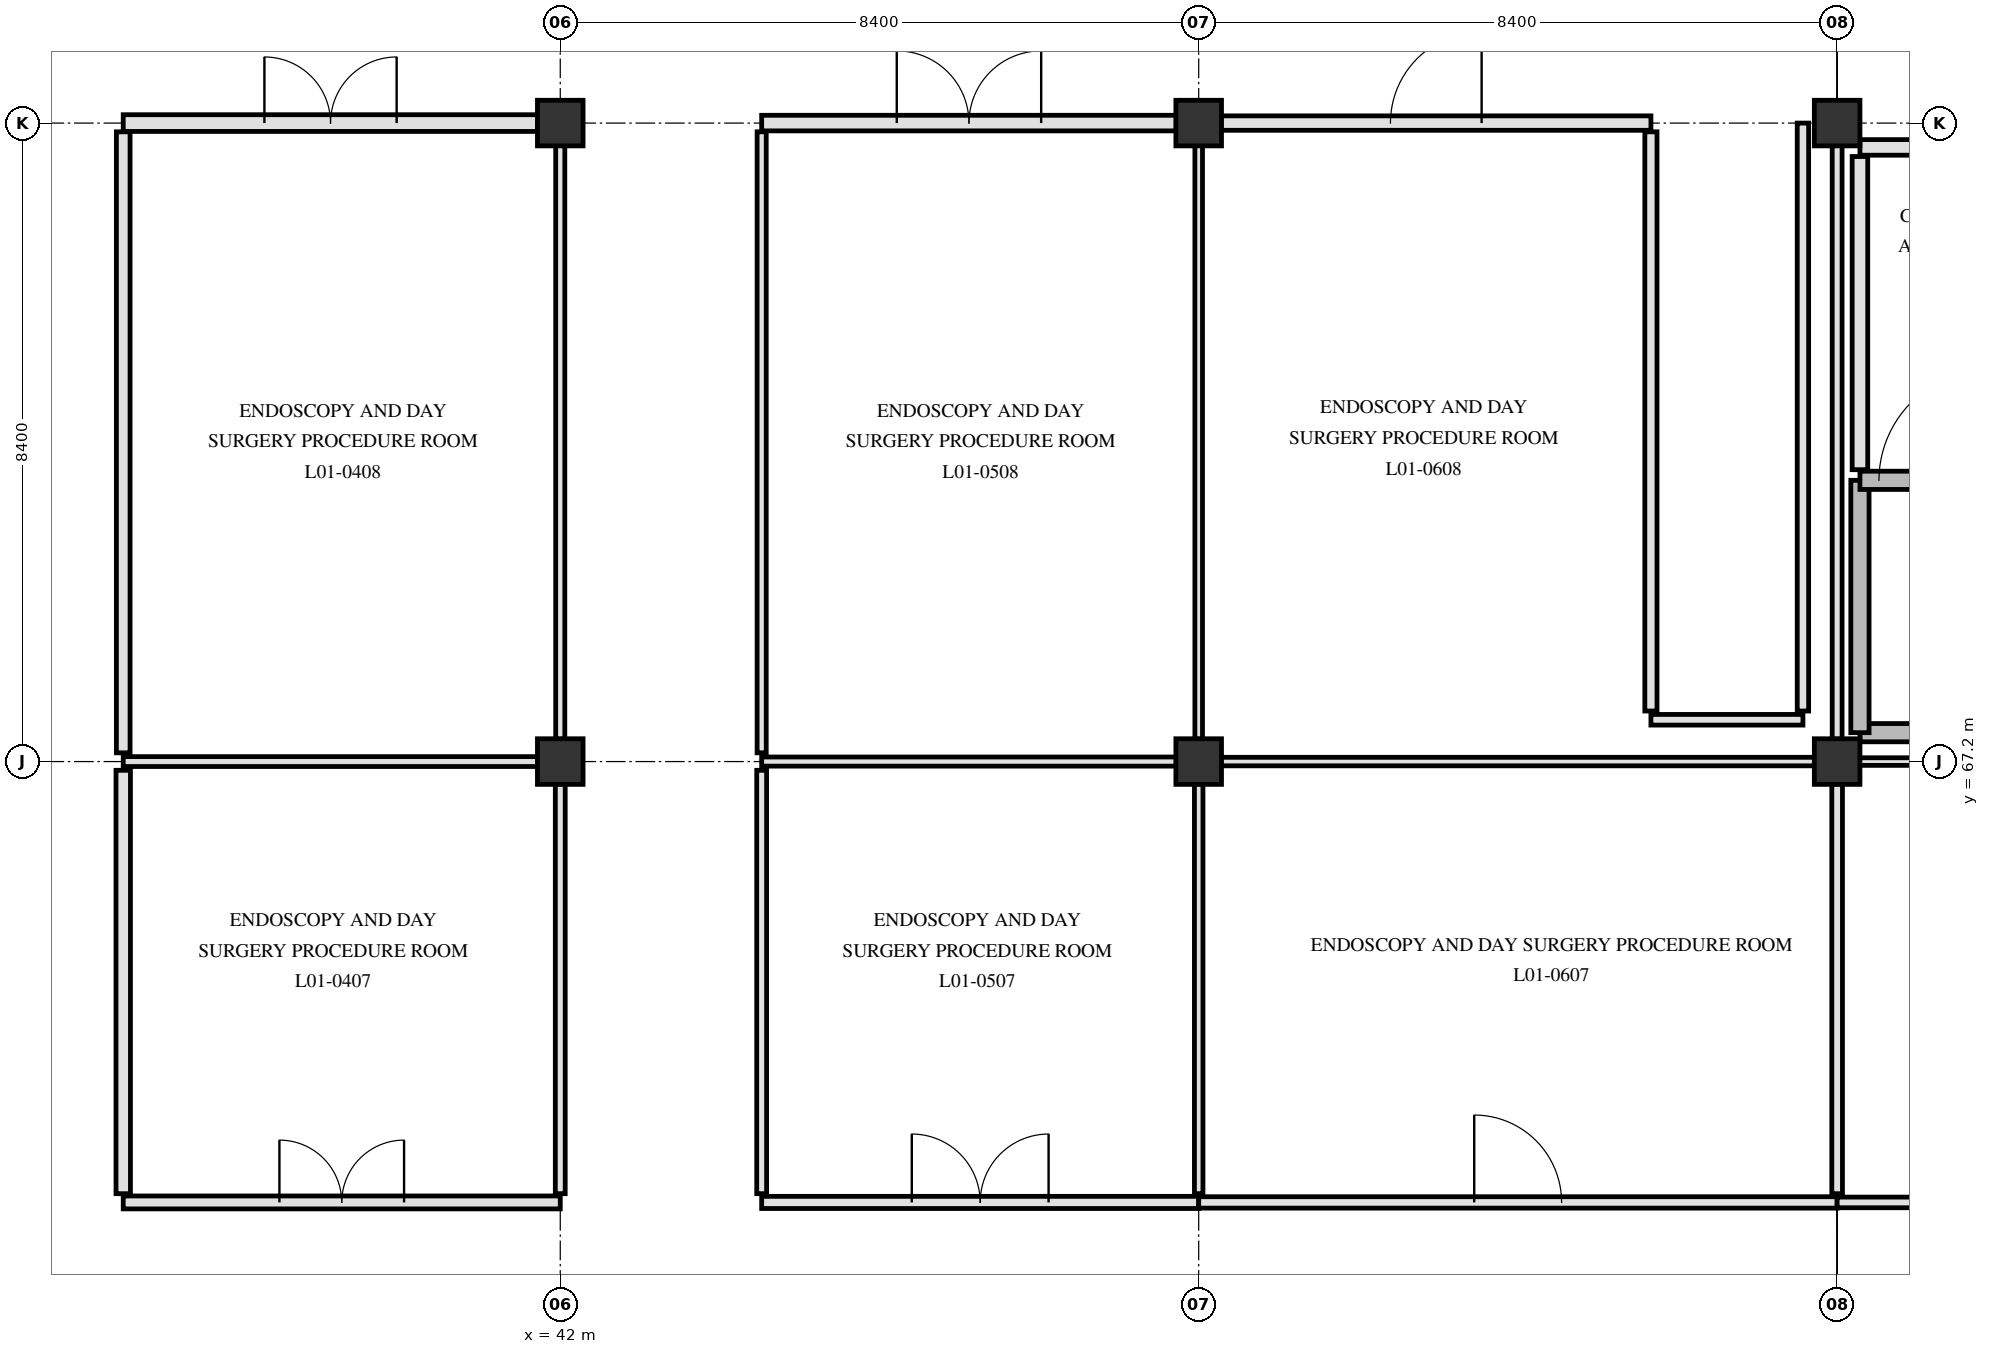
"""IFC4 building model, lengths in metres.
Left out: names, types, materials, properties, quantities, classifications, styles, units other than length and angle.
Written with IfcOpenShell. Run it as: python <this file> out.ifc"""

import sys

from ifc_helpers import new_model, si_unit, direction, frame, frame_2d, origin, origin_2d, place, context, subcontext, project, spatial, rectangle, extrude, element, fill, save


model = new_model("IFC4")
c1 = context("Model", 3, precision=1e-05, world=origin(), true_north=direction((0.0, 1.0)))
c2 = subcontext(c1, "Body", "Model", "MODEL_VIEW")
j1 = project(units=[si_unit("LENGTHUNIT", "METRE"), si_unit("PLANEANGLEUNIT", "RADIAN")], contexts=[c1])
p1 = place(None, origin())
s1 = spatial("IfcSite", under=j1, at=p1, CompositionType="ELEMENT")
p2 = place(p1, origin())
s2 = spatial("IfcBuilding", under=s1, at=p2, CompositionType="ELEMENT")
p3 = place(p2, frame((0.0, 0.0, 4.8)))
s3 = spatial("IfcBuildingStorey", under=s2, at=p3, CompositionType="ELEMENT", Elevation=4.8)
for number, where, z_axis, x_axis in (
    (1, (42.0, 67.2, 0.0), (0.0, 0.0, 1.0), (1.0, 0.0, 0.0)),
    (2, (42.0, 75.6, 0.0), (0.0, 0.0, 1.0), (1.0, 0.0, 0.0)),
    (3, (50.4, 67.2, 0.0), (0.0, 0.0, 1.0), (1.0, 0.0, 0.0)),
    (4, (50.4, 75.6, 0.0), (0.0, 0.0, 1.0), (1.0, 0.0, 0.0)),
    (5, (58.8, 67.2, 0.0), (0.0, 0.0, 1.0), (1.0, 0.0, 0.0)),
    (6, (58.8, 75.6, 0.0), (0.0, 0.0, 1.0), (1.0, 0.0, 0.0)),
):
    element("IfcColumn", number, at=place(p3, frame(where, z_axis=z_axis, x_axis=x_axis)), inside=s3, PredefinedType="COLUMN", context=c2, shape_type="SweptSolid", body=[
        extrude(rectangle(XDim=0.6, YDim=0.6, at=origin_2d()), origin(), (0.0, 0.0, 1.0), 4.5),
    ])
p4 = place(p3, frame((59.1, 67.58, 0.0), z_axis=(0.0, 0.0, 1.0), x_axis=(1.0, 0.0, 0.0)))
e7 = element("IfcWall", 7, at=p4, inside=s3, PredefinedType="SHEAR", context=c2, shape_type="SweptSolid", body=[
    extrude(rectangle(XDim=7.82, YDim=0.24, at=frame_2d((3.91, 0.0))), origin(), (0.0, 0.0, 1.0), 4.15),
])
p5 = place(p3, frame((59.1, 67.58, 0.0), z_axis=(0.0, 0.0, 1.0), x_axis=(0.0, 1.0, 0.0)))
e8 = element("IfcWall", 8, at=p5, inside=s3, PredefinedType="SHEAR", context=c2, shape_type="SweptSolid", body=[
    extrude(rectangle(XDim=3.32, YDim=0.24, at=frame_2d((1.66, 0.0))), origin(), (0.0, 0.0, 1.0), 4.15),
])
p6 = place(p3, frame((59.1, 70.9, 0.0), z_axis=(0.0, 0.0, 1.0), x_axis=(1.0, 0.0, 0.0)))
e9 = element("IfcWall", 9, at=p6, inside=s3, PredefinedType="SHEAR", context=c2, shape_type="SweptSolid", body=[
    extrude(rectangle(XDim=7.82, YDim=0.24, at=frame_2d((3.91, 0.0))), origin(), (0.0, 0.0, 1.0), 4.15),
])
p7 = place(p6, frame((0.25, 0.0, 0.0)))
e10 = element("IfcOpeningElement", 10, at=p7, cuts=e9, PredefinedType="OPENING", context=c2, shape_type="SweptSolid", body=[
    extrude(rectangle(XDim=1.45, YDim=2.2, at=frame_2d((0.725, 1.1))), frame((0.0, 0.13, 0.0), z_axis=(0.0, -1.0, 0.0), x_axis=(1.0, 0.0, 0.0)), (0.0, 0.0, 1.0), 0.26),
])
p8 = place(p3, frame((59.1, 71.04, 0.0), z_axis=(0.0, 0.0, 1.0), x_axis=(0.0, 1.0, 0.0)))
e11 = element("IfcWall", 11, at=p8, inside=s3, PredefinedType="PARTITIONING", context=c2, shape_type="SweptSolid", body=[
    extrude(rectangle(XDim=4.12, YDim=0.205, at=frame_2d((2.06, 0.0))), origin(), (0.0, 0.0, 1.0), 3.59),
])
p9 = place(p3, frame((59.1, 75.28, 0.0), z_axis=(0.0, 0.0, 1.0), x_axis=(1.0, 0.0, 0.0)))
e12 = element("IfcWall", 12, at=p9, inside=s3, PredefinedType="PARTITIONING", context=c2, shape_type="SweptSolid", body=[
    extrude(rectangle(XDim=4.18, YDim=0.205, at=frame_2d((2.09, 0.0))), origin(), (0.0, 0.0, 1.0), 3.54),
])
p10 = place(p9, frame((1.29, 0.0, 0.0)))
e13 = element("IfcOpeningElement", 13, at=p10, cuts=e12, PredefinedType="OPENING", context=c2, shape_type="SweptSolid", body=[
    extrude(rectangle(XDim=1.6, YDim=2.25, at=frame_2d((0.8, 1.125))), frame((0.0, 0.113, 0.0), z_axis=(0.0, -1.0, 0.0), x_axis=(1.0, 0.0, 0.0)), (0.0, 0.0, 1.0), 0.225),
])
p11 = place(p3, frame((36.25, 61.4, 0.0), z_axis=(0.0, 0.0, 1.0), x_axis=(1.0, 0.0, 0.0)))
e14 = element("IfcWall", 14, at=p11, inside=s3, PredefinedType="PARTITIONING", context=c2, shape_type="SweptSolid", body=[
    extrude(rectangle(XDim=5.75, YDim=0.17, at=frame_2d((2.875, 0.0))), origin(), (0.0, 0.0, 1.0), 3.59),
])
p12 = place(p11, frame((2.055, 0.0, 0.0)))
e15 = element("IfcOpeningElement", 15, at=p12, cuts=e14, PredefinedType="OPENING", context=c2, shape_type="SweptSolid", body=[
    extrude(rectangle(XDim=1.64, YDim=2.28, at=frame_2d((0.82, 1.14))), frame((0.0, 0.095, 0.0), z_axis=(0.0, -1.0, 0.0), x_axis=(1.0, 0.0, 0.0)), (0.0, 0.0, 1.0), 0.19),
])
p13 = place(p3, frame((44.65, 61.4, 0.0), z_axis=(0.0, 0.0, 1.0), x_axis=(1.0, 0.0, 0.0)))
e16 = element("IfcWall", 16, at=p13, inside=s3, PredefinedType="PARTITIONING", context=c2, shape_type="SweptSolid", body=[
    extrude(rectangle(XDim=5.75, YDim=0.16, at=frame_2d((2.875, 0.0))), origin(), (0.0, 0.0, 1.0), 3.59),
])
p14 = place(p13, frame((1.975, 0.0, 0.0)))
e17 = element("IfcOpeningElement", 17, at=p14, cuts=e16, PredefinedType="OPENING", context=c2, shape_type="SweptSolid", body=[
    extrude(rectangle(XDim=1.8, YDim=2.25, at=frame_2d((0.9, 1.125))), frame((0.0, 0.09, 0.0), z_axis=(0.0, -1.0, 0.0), x_axis=(1.0, 0.0, 0.0)), (0.0, 0.0, 1.0), 0.18),
])
p15 = place(p3, frame((50.4, 61.4, 0.0), z_axis=(0.0, 0.0, 1.0), x_axis=(1.0, 0.0, 0.0)))
e18 = element("IfcWall", 18, at=p15, inside=s3, PredefinedType="PARTITIONING", context=c2, shape_type="SweptSolid", body=[
    extrude(rectangle(XDim=8.4, YDim=0.15, at=frame_2d((4.2, 0.0))), origin(), (0.0, 0.0, 1.0), 3.59),
])
p16 = place(p15, frame((3.625, 0.0, 0.0)))
e19 = element("IfcOpeningElement", 19, at=p16, cuts=e18, PredefinedType="OPENING", context=c2, shape_type="SweptSolid", body=[
    extrude(rectangle(XDim=1.15, YDim=2.15, at=frame_2d((0.575, 1.075))), frame((0.0, 0.085, 0.0), z_axis=(0.0, -1.0, 0.0), x_axis=(1.0, 0.0, 0.0)), (0.0, 0.0, 1.0), 0.17),
])
p17 = place(p3, frame((58.8, 61.4, 0.0), z_axis=(0.0, 0.0, 1.0), x_axis=(1.0, 0.0, 0.0)))
e20 = element("IfcWall", 20, at=p17, inside=s3, PredefinedType="PARTITIONING", context=c2, shape_type="SweptSolid", body=[
    extrude(rectangle(XDim=8.4, YDim=0.14, at=frame_2d((4.2, 0.0))), origin(), (0.0, 0.0, 1.0), 3.59),
])
p18 = place(p17, frame((3.38, 0.0, 0.0)))
e21 = element("IfcOpeningElement", 21, at=p18, cuts=e20, PredefinedType="OPENING", context=c2, shape_type="SweptSolid", body=[
    extrude(rectangle(XDim=1.64, YDim=2.28, at=frame_2d((0.82, 1.14))), frame((0.0, 0.08, 0.0), z_axis=(0.0, -1.0, 0.0), x_axis=(1.0, 0.0, 0.0)), (0.0, 0.0, 1.0), 0.16),
])
p19 = place(p3, frame((36.25, 67.2, 0.0), z_axis=(0.0, 0.0, 1.0), x_axis=(1.0, 0.0, 0.0)))
e22 = element("IfcWall", 22, at=p19, inside=s3, PredefinedType="PARTITIONING", context=c2, shape_type="SweptSolid", body=[
    extrude(rectangle(XDim=5.455, YDim=0.13, at=frame_2d((2.728, 0.0))), origin(), (0.0, 0.0, 1.0), 3.54),
])
p20 = place(p3, frame((44.65, 67.2, 0.0), z_axis=(0.0, 0.0, 1.0), x_axis=(1.0, 0.0, 0.0)))
e23 = element("IfcWall", 23, at=p20, inside=s3, PredefinedType="PARTITIONING", context=c2, shape_type="SweptSolid", body=[
    extrude(rectangle(XDim=5.455, YDim=0.12, at=frame_2d((2.728, 0.0))), origin(), (0.0, 0.0, 1.0), 3.54),
])
p21 = place(p3, frame((50.695, 67.2, 0.0), z_axis=(0.0, 0.0, 1.0), x_axis=(1.0, 0.0, 0.0)))
e24 = element("IfcWall", 24, at=p21, inside=s3, PredefinedType="PARTITIONING", context=c2, shape_type="SweptSolid", body=[
    extrude(rectangle(XDim=7.81, YDim=0.112, at=frame_2d((3.905, 0.0))), origin(), (0.0, 0.0, 1.0), 3.54),
])
p22 = place(p3, frame((59.095, 67.2, 0.0), z_axis=(0.0, 0.0, 1.0), x_axis=(1.0, 0.0, 0.0)))
e25 = element("IfcWall", 25, at=p22, inside=s3, PredefinedType="PARTITIONING", context=c2, shape_type="SweptSolid", body=[
    extrude(rectangle(XDim=7.81, YDim=0.1, at=frame_2d((3.905, 0.0))), origin(), (0.0, 0.0, 1.0), 3.54),
])
p23 = place(p3, frame((56.35, 67.75, 0.0), z_axis=(0.0, 0.0, 1.0), x_axis=(1.0, 0.0, 0.0)))
e26 = element("IfcWall", 26, at=p23, inside=s3, PredefinedType="PARTITIONING", context=c2, shape_type="SweptSolid", body=[
    extrude(rectangle(XDim=2.0, YDim=0.14, at=frame_2d((1.0, 0.0))), origin(), (0.0, 0.0, 1.0), 4.14),
])
p24 = place(p3, frame((36.25, 75.6, 0.0), z_axis=(0.0, 0.0, 1.0), x_axis=(1.0, 0.0, 0.0)))
e27 = element("IfcWall", 27, at=p24, inside=s3, PredefinedType="PARTITIONING", context=c2, shape_type="SweptSolid", body=[
    extrude(rectangle(XDim=5.455, YDim=0.22, at=frame_2d((2.728, 0.0))), origin(), (0.0, 0.0, 1.0), 3.54),
])
p25 = place(p24, frame((1.857, 0.0, 0.0)))
e28 = element("IfcOpeningElement", 28, at=p25, cuts=e27, PredefinedType="OPENING", context=c2, shape_type="SweptSolid", body=[
    extrude(rectangle(XDim=1.74, YDim=2.24, at=frame_2d((0.87, 1.12))), frame((0.0, 0.12, 0.0), z_axis=(0.0, -1.0, 0.0), x_axis=(1.0, 0.0, 0.0)), (0.0, 0.0, 1.0), 0.24),
])
p26 = place(p3, frame((44.65, 75.6, 0.0), z_axis=(0.0, 0.0, 1.0), x_axis=(1.0, 0.0, 0.0)))
e29 = element("IfcWall", 29, at=p26, inside=s3, PredefinedType="PARTITIONING", context=c2, shape_type="SweptSolid", body=[
    extrude(rectangle(XDim=5.455, YDim=0.205, at=frame_2d((2.728, 0.0))), origin(), (0.0, 0.0, 1.0), 3.54),
])
p27 = place(p26, frame((1.778, 0.0, 0.0)))
e30 = element("IfcOpeningElement", 30, at=p27, cuts=e29, PredefinedType="OPENING", context=c2, shape_type="SweptSolid", body=[
    extrude(rectangle(XDim=1.9, YDim=2.3, at=frame_2d((0.95, 1.15))), frame((0.0, 0.113, 0.0), z_axis=(0.0, -1.0, 0.0), x_axis=(1.0, 0.0, 0.0)), (0.0, 0.0, 1.0), 0.225),
])
p28 = place(p3, frame((50.695, 75.6, 0.0), z_axis=(0.0, 0.0, 1.0), x_axis=(1.0, 0.0, 0.0)))
e31 = element("IfcWall", 31, at=p28, inside=s3, PredefinedType="PARTITIONING", context=c2, shape_type="SweptSolid", body=[
    extrude(rectangle(XDim=5.655, YDim=0.19, at=frame_2d((2.828, 0.0))), origin(), (0.0, 0.0, 1.0), 3.54),
])
p29 = place(p28, frame((2.228, 0.0, 0.0)))
e32 = element("IfcOpeningElement", 32, at=p29, cuts=e31, PredefinedType="OPENING", context=c2, shape_type="SweptSolid", body=[
    extrude(rectangle(XDim=1.2, YDim=2.15, at=frame_2d((0.6, 1.075))), frame((0.0, 0.105, 0.0), z_axis=(0.0, -1.0, 0.0), x_axis=(1.0, 0.0, 0.0)), (0.0, 0.0, 1.0), 0.21),
])
p30 = place(p3, frame((36.25, 61.515, 0.0), z_axis=(0.0, 0.0, 1.0), x_axis=(0.0, 1.0, 0.0)))
e33 = element("IfcWall", 33, at=p30, inside=s3, PredefinedType="PARTITIONING", context=c2, shape_type="SweptSolid", body=[
    extrude(rectangle(XDim=5.57, YDim=0.19, at=frame_2d((2.785, 0.0))), origin(), (0.0, 0.0, 1.0), 3.54),
])
p31 = place(p3, frame((36.25, 67.315, 0.0), z_axis=(0.0, 0.0, 1.0), x_axis=(0.0, 1.0, 0.0)))
e34 = element("IfcWall", 34, at=p31, inside=s3, PredefinedType="PARTITIONING", context=c2, shape_type="SweptSolid", body=[
    extrude(rectangle(XDim=8.17, YDim=0.18, at=frame_2d((4.085, 0.0))), origin(), (0.0, 0.0, 1.0), 3.54),
])
p32 = place(p3, frame((42.0, 61.515, 0.0), z_axis=(0.0, 0.0, 1.0), x_axis=(0.0, 1.0, 0.0)))
e35 = element("IfcWall", 35, at=p32, inside=s3, PredefinedType="PARTITIONING", context=c2, shape_type="SweptSolid", body=[
    extrude(rectangle(XDim=5.39, YDim=0.13, at=frame_2d((2.695, 0.0))), origin(), (0.0, 0.0, 1.0), 3.59),
])
p33 = place(p3, frame((42.0, 67.495, 0.0), z_axis=(0.0, 0.0, 1.0), x_axis=(0.0, 1.0, 0.0)))
e36 = element("IfcWall", 36, at=p33, inside=s3, PredefinedType="PARTITIONING", context=c2, shape_type="SweptSolid", body=[
    extrude(rectangle(XDim=7.81, YDim=0.12, at=frame_2d((3.905, 0.0))), origin(), (0.0, 0.0, 1.0), 3.59),
])
p34 = place(p3, frame((44.65, 61.515, 0.0), z_axis=(0.0, 0.0, 1.0), x_axis=(0.0, 1.0, 0.0)))
e37 = element("IfcWall", 37, at=p34, inside=s3, PredefinedType="PARTITIONING", context=c2, shape_type="SweptSolid", body=[
    extrude(rectangle(XDim=5.57, YDim=0.13, at=frame_2d((2.785, 0.0))), origin(), (0.0, 0.0, 1.0), 3.54),
])
p35 = place(p3, frame((44.65, 67.315, 0.0), z_axis=(0.0, 0.0, 1.0), x_axis=(0.0, 1.0, 0.0)))
e38 = element("IfcWall", 38, at=p35, inside=s3, PredefinedType="PARTITIONING", context=c2, shape_type="SweptSolid", body=[
    extrude(rectangle(XDim=8.17, YDim=0.12, at=frame_2d((4.085, 0.0))), origin(), (0.0, 0.0, 1.0), 3.54),
])
p36 = place(p3, frame((50.4, 61.515, 0.0), z_axis=(0.0, 0.0, 1.0), x_axis=(0.0, 1.0, 0.0)))
e39 = element("IfcWall", 39, at=p36, inside=s3, PredefinedType="PARTITIONING", context=c2, shape_type="SweptSolid", body=[
    extrude(rectangle(XDim=5.39, YDim=0.112, at=frame_2d((2.695, 0.0))), origin(), (0.0, 0.0, 1.0), 3.59),
])
p37 = place(p3, frame((50.4, 67.495, 0.0), z_axis=(0.0, 0.0, 1.0), x_axis=(0.0, 1.0, 0.0)))
e40 = element("IfcWall", 40, at=p37, inside=s3, PredefinedType="PARTITIONING", context=c2, shape_type="SweptSolid", body=[
    extrude(rectangle(XDim=7.81, YDim=0.1, at=frame_2d((3.905, 0.0))), origin(), (0.0, 0.0, 1.0), 3.59),
])
p38 = place(p3, frame((56.35, 67.865, 0.0), z_axis=(0.0, 0.0, 1.0), x_axis=(0.0, 1.0, 0.0)))
e41 = element("IfcWall", 41, at=p38, inside=s3, PredefinedType="PARTITIONING", context=c2, shape_type="SweptSolid", body=[
    extrude(rectangle(XDim=7.62, YDim=0.16, at=frame_2d((3.81, 0.0))), origin(), (0.0, 0.0, 1.0), 3.54),
])
p39 = place(p3, frame((58.35, 67.865, 0.0), z_axis=(0.0, 0.0, 1.0), x_axis=(0.0, 1.0, 0.0)))
e42 = element("IfcWall", 42, at=p39, inside=s3, PredefinedType="PARTITIONING", context=c2, shape_type="SweptSolid", body=[
    extrude(rectangle(XDim=7.735, YDim=0.15, at=frame_2d((3.868, 0.0))), origin(), (0.0, 0.0, 1.0), 3.54),
])
p40 = place(p3, frame((58.8, 61.515, 0.0), z_axis=(0.0, 0.0, 1.0), x_axis=(0.0, 1.0, 0.0)))
e43 = element("IfcWall", 43, at=p40, inside=s3, PredefinedType="PARTITIONING", context=c2, shape_type="SweptSolid", body=[
    extrude(rectangle(XDim=5.39, YDim=0.14, at=frame_2d((2.695, 0.0))), origin(), (0.0, 0.0, 1.0), 3.59),
])
p41 = place(p3, frame((58.8, 67.495, 0.0), z_axis=(0.0, 0.0, 1.0), x_axis=(0.0, 1.0, 0.0)))
e44 = element("IfcWall", 44, at=p41, inside=s3, PredefinedType="PARTITIONING", context=c2, shape_type="SweptSolid", body=[
    extrude(rectangle(XDim=7.81, YDim=0.13, at=frame_2d((3.905, 0.0))), origin(), (0.0, 0.0, 1.0), 3.59),
])
p42 = place(p7, origin())
e45 = element("IfcDoor", 45, at=p42, inside=s3, OperationType="SINGLE_SWING_RIGHT", PredefinedType="DOOR", context=c2, shape_type="SweptSolid", body=[
    extrude(rectangle(XDim=1.45, YDim=2.2, at=frame_2d((0.725, 1.1))), frame((0.0, 0.025, 0.0), z_axis=(0.0, -1.0, 0.0), x_axis=(1.0, 0.0, 0.0)), (0.0, 0.0, 1.0), 0.05),
])
fill(e10, e45)
p43 = place(p12, origin())
e46 = element("IfcDoor", 46, at=p43, inside=s3, OperationType="DOUBLE_SWING_LEFT", PredefinedType="DOOR", context=c2, shape_type="SweptSolid", body=[
    extrude(rectangle(XDim=1.64, YDim=2.28, at=frame_2d((0.82, 1.14))), frame((0.0, 0.025, 0.0), z_axis=(0.0, -1.0, 0.0), x_axis=(1.0, 0.0, 0.0)), (0.0, 0.0, 1.0), 0.05),
])
fill(e15, e46)
p44 = place(p25, origin())
e47 = element("IfcDoor", 47, at=p44, inside=s3, OperationType="DOUBLE_SWING_RIGHT", PredefinedType="DOOR", context=c2, shape_type="SweptSolid", body=[
    extrude(rectangle(XDim=1.74, YDim=2.24, at=frame_2d((0.87, 1.12))), frame((0.0, 0.025, 0.0), z_axis=(0.0, -1.0, 0.0), x_axis=(1.0, 0.0, 0.0)), (0.0, 0.0, 1.0), 0.05),
])
fill(e28, e47)
p45 = place(p14, origin())
e48 = element("IfcDoor", 48, at=p45, inside=s3, OperationType="DOUBLE_SWING_RIGHT", PredefinedType="DOOR", context=c2, shape_type="SweptSolid", body=[
    extrude(rectangle(XDim=1.8, YDim=2.25, at=frame_2d((0.9, 1.125))), frame((0.0, 0.025, 0.0), z_axis=(0.0, -1.0, 0.0), x_axis=(1.0, 0.0, 0.0)), (0.0, 0.0, 1.0), 0.05),
])
fill(e17, e48)
p46 = place(p27, origin())
e49 = element("IfcDoor", 49, at=p46, inside=s3, OperationType="DOUBLE_SWING_LEFT", PredefinedType="DOOR", context=c2, shape_type="SweptSolid", body=[
    extrude(rectangle(XDim=1.9, YDim=2.3, at=frame_2d((0.95, 1.15))), frame((0.0, 0.025, 0.0), z_axis=(0.0, -1.0, 0.0), x_axis=(1.0, 0.0, 0.0)), (0.0, 0.0, 1.0), 0.05),
])
fill(e30, e49)
p47 = place(p16, origin())
e50 = element("IfcDoor", 50, at=p47, inside=s3, OperationType="SINGLE_SWING_LEFT", PredefinedType="DOOR", context=c2, shape_type="SweptSolid", body=[
    extrude(rectangle(XDim=1.15, YDim=2.15, at=frame_2d((0.575, 1.075))), frame((0.0, 0.025, 0.0), z_axis=(0.0, -1.0, 0.0), x_axis=(1.0, 0.0, 0.0)), (0.0, 0.0, 1.0), 0.05),
])
fill(e19, e50)
p48 = place(p29, origin())
e51 = element("IfcDoor", 51, at=p48, inside=s3, OperationType="SINGLE_SWING_RIGHT", PredefinedType="DOOR", context=c2, shape_type="SweptSolid", body=[
    extrude(rectangle(XDim=1.2, YDim=2.15, at=frame_2d((0.6, 1.075))), frame((0.0, 0.025, 0.0), z_axis=(0.0, -1.0, 0.0), x_axis=(1.0, 0.0, 0.0)), (0.0, 0.0, 1.0), 0.05),
])
fill(e32, e51)
save(model, sys.argv[1])
